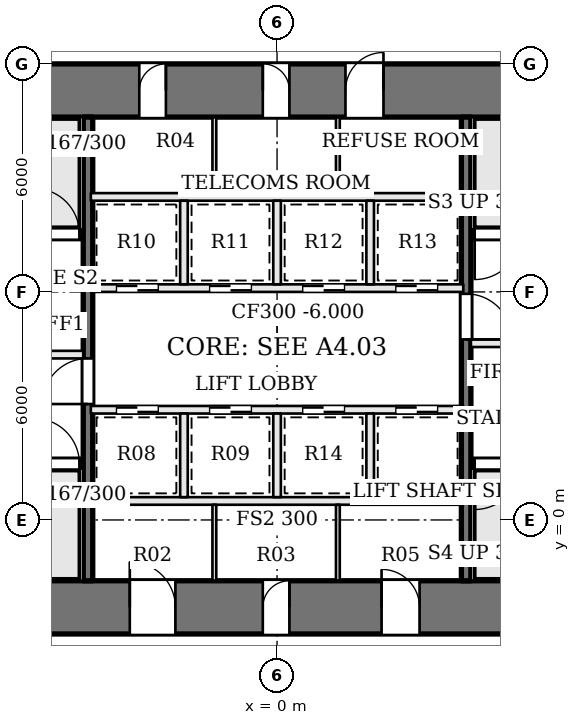
"""IFC4 building model, lengths in metres.
Left out: names, types, materials, properties, quantities, classifications, styles, units other than length and angle.
Written with IfcOpenShell. Run it as: python <this file> out.ifc"""

import sys

from ifc_helpers import new_model, si_unit, direction, frame, frame_2d, origin, place, context, subcontext, project, spatial, rectangle, extrude, element, fill, save


model = new_model("IFC4")
c1 = context("Model", 3, precision=1e-05, world=origin(), true_north=direction((0.0, 1.0)))
c2 = subcontext(c1, "Body", "Model", "MODEL_VIEW")
j1 = project(units=[si_unit("LENGTHUNIT", "METRE"), si_unit("PLANEANGLEUNIT", "RADIAN")], contexts=[c1])
p1 = place(None, origin())
s1 = spatial("IfcSite", under=j1, at=p1, CompositionType="ELEMENT")
p2 = place(p1, origin())
s2 = spatial("IfcBuilding", under=s1, at=p2, CompositionType="ELEMENT")
p3 = place(p2, frame((0.0, 0.0, -6.0)))
s3 = spatial("IfcBuildingStorey", under=s2, at=p3, CompositionType="ELEMENT", Elevation=-6.0)
p4 = place(p3, frame((-13.0, 11.3, 0.0), z_axis=(0.0, 0.0, 1.0), x_axis=(1.0, 0.0, 0.0)))
e1 = element("IfcWall", 1, at=p4, inside=s3, PredefinedType="SHEAR", context=c2, shape_type="SweptSolid", body=[
    extrude(rectangle(XDim=26.0, YDim=1.4, at=frame_2d((13.0, 0.0))), origin(), (0.0, 0.0, 1.0), 6.0),
])
p5 = place(p4, frame((9.375, 0.0, 0.0)))
e2 = element("IfcOpeningElement", 2, at=p5, cuts=e1, PredefinedType="OPENING", context=c2, shape_type="SweptSolid", body=[
    extrude(rectangle(XDim=0.7, YDim=2.1, at=frame_2d((0.35, 1.05))), frame((0.0, 0.71, 0.0), z_axis=(0.0, -1.0, 0.0), x_axis=(1.0, 0.0, 0.0)), (0.0, 0.0, 1.0), 1.42),
])
p6 = place(p4, frame((12.625, 0.0, 0.0)))
e3 = element("IfcOpeningElement", 3, at=p6, cuts=e1, PredefinedType="OPENING", context=c2, shape_type="SweptSolid", body=[
    extrude(rectangle(XDim=0.7, YDim=2.1, at=frame_2d((0.35, 1.05))), frame((0.0, 0.71, 0.0), z_axis=(0.0, -1.0, 0.0), x_axis=(1.0, 0.0, 0.0)), (0.0, 0.0, 1.0), 1.42),
])
p7 = place(p4, frame((14.8, 0.0, 0.0)))
e4 = element("IfcOpeningElement", 4, at=p7, cuts=e1, PredefinedType="OPENING", context=c2, shape_type="SweptSolid", body=[
    extrude(rectangle(XDim=1.0, YDim=2.1, at=frame_2d((0.5, 1.05))), frame((0.0, 0.71, 0.0), z_axis=(0.0, -1.0, 0.0), x_axis=(1.0, 0.0, 0.0)), (0.0, 0.0, 1.0), 1.42),
])
p8 = place(p3, frame((-13.0, -2.3, 0.0), z_axis=(0.0, 0.0, 1.0), x_axis=(1.0, 0.0, 0.0)))
e5 = element("IfcWall", 5, at=p8, inside=s3, PredefinedType="SHEAR", context=c2, shape_type="SweptSolid", body=[
    extrude(rectangle(XDim=26.0, YDim=1.4, at=frame_2d((13.0, 0.0))), origin(), (0.0, 0.0, 1.0), 6.0),
])
p9 = place(p8, frame((9.125, 0.0, 0.0)))
e6 = element("IfcOpeningElement", 6, at=p9, cuts=e5, PredefinedType="OPENING", context=c2, shape_type="SweptSolid", body=[
    extrude(rectangle(XDim=1.2, YDim=2.1, at=frame_2d((0.6, 1.05))), frame((0.0, 0.71, 0.0), z_axis=(0.0, -1.0, 0.0), x_axis=(1.0, 0.0, 0.0)), (0.0, 0.0, 1.0), 1.42),
])
p10 = place(p8, frame((12.625, 0.0, 0.0)))
e7 = element("IfcOpeningElement", 7, at=p10, cuts=e5, PredefinedType="OPENING", context=c2, shape_type="SweptSolid", body=[
    extrude(rectangle(XDim=0.7, YDim=2.1, at=frame_2d((0.35, 1.05))), frame((0.0, 0.71, 0.0), z_axis=(0.0, -1.0, 0.0), x_axis=(1.0, 0.0, 0.0)), (0.0, 0.0, 1.0), 1.42),
])
p11 = place(p8, frame((15.75, 0.0, 0.0)))
e8 = element("IfcOpeningElement", 8, at=p11, cuts=e5, PredefinedType="OPENING", context=c2, shape_type="SweptSolid", body=[
    extrude(rectangle(XDim=1.0, YDim=2.1, at=frame_2d((0.5, 1.05))), frame((0.0, 0.71, 0.0), z_axis=(0.0, -1.0, 0.0), x_axis=(1.0, 0.0, 0.0)), (0.0, 0.0, 1.0), 1.42),
])
p12 = place(p3, frame((-11.6, 1.475, 0.0), z_axis=(0.0, 0.0, 1.0), x_axis=(1.0, 0.0, 0.0)))
e9 = element("IfcWall", 9, at=p12, inside=s3, PredefinedType="SOLIDWALL", context=c2, shape_type="SweptSolid", body=[
    extrude(rectangle(XDim=6.5, YDim=0.25, at=frame_2d((3.25, 0.0))), origin(), (0.0, 0.0, 1.0), 5.65),
])
p13 = place(p12, frame((5.2, 0.0, 0.0)))
e10 = element("IfcOpeningElement", 10, at=p13, cuts=e9, PredefinedType="OPENING", context=c2, shape_type="SweptSolid", body=[
    extrude(rectangle(XDim=1.2, YDim=2.1, at=frame_2d((0.6, 1.05))), frame((0.0, 0.135, 0.0), z_axis=(0.0, -1.0, 0.0), x_axis=(1.0, 0.0, 0.0)), (0.0, 0.0, 1.0), 0.27),
])
p14 = place(p3, frame((11.6, 7.525, 0.0), z_axis=(0.0, 0.0, 1.0), x_axis=(-1.0, 0.0, 0.0)))
e11 = element("IfcWall", 11, at=p14, inside=s3, PredefinedType="SOLIDWALL", context=c2, shape_type="SweptSolid", body=[
    extrude(rectangle(XDim=6.5, YDim=0.25, at=frame_2d((3.25, 0.0))), origin(), (0.0, 0.0, 1.0), 5.65),
])
p15 = place(p14, frame((5.2, 0.0, 0.0)))
e12 = element("IfcOpeningElement", 12, at=p15, cuts=e11, PredefinedType="OPENING", context=c2, shape_type="SweptSolid", body=[
    extrude(rectangle(XDim=1.2, YDim=2.1, at=frame_2d((0.6, 1.05))), frame((0.0, 0.135, 0.0), z_axis=(0.0, -1.0, 0.0), x_axis=(1.0, 0.0, 0.0)), (0.0, 0.0, 1.0), 0.27),
])
p16 = place(p3, frame((-11.6, 4.35, 0.0), z_axis=(0.0, 0.0, 1.0), x_axis=(1.0, 0.0, 0.0)))
e13 = element("IfcWall", 13, at=p16, inside=s3, PredefinedType="SOLIDWALL", context=c2, shape_type="SweptSolid", body=[
    extrude(rectangle(XDim=6.5, YDim=0.2, at=frame_2d((3.25, 0.0))), origin(), (0.0, 0.0, 1.0), 5.65),
])
p17 = place(p16, frame((3.8, 0.0, 0.0)))
e14 = element("IfcOpeningElement", 14, at=p17, cuts=e13, PredefinedType="OPENING", context=c2, shape_type="SweptSolid", body=[
    extrude(rectangle(XDim=1.2, YDim=2.1, at=frame_2d((0.6, 1.05))), frame((0.0, 0.11, 0.0), z_axis=(0.0, -1.0, 0.0), x_axis=(1.0, 0.0, 0.0)), (0.0, 0.0, 1.0), 0.22),
])
p18 = place(p16, frame((0.5, 0.0, 0.0)))
e15 = element("IfcOpeningElement", 15, at=p18, cuts=e13, PredefinedType="OPENING", context=c2, shape_type="SweptSolid", body=[
    extrude(rectangle(XDim=1.2, YDim=2.1, at=frame_2d((0.6, 1.05))), frame((0.0, 0.11, 0.0), z_axis=(0.0, -1.0, 0.0), x_axis=(1.0, 0.0, 0.0)), (0.0, 0.0, 1.0), 0.22),
])
p19 = place(p3, frame((11.6, 4.65, 0.0), z_axis=(0.0, 0.0, 1.0), x_axis=(-1.0, 0.0, 0.0)))
e16 = element("IfcWall", 16, at=p19, inside=s3, PredefinedType="SOLIDWALL", context=c2, shape_type="SweptSolid", body=[
    extrude(rectangle(XDim=6.5, YDim=0.2, at=frame_2d((3.25, 0.0))), origin(), (0.0, 0.0, 1.0), 5.65),
])
p20 = place(p19, frame((3.8, 0.0, 0.0)))
e17 = element("IfcOpeningElement", 17, at=p20, cuts=e16, PredefinedType="OPENING", context=c2, shape_type="SweptSolid", body=[
    extrude(rectangle(XDim=1.2, YDim=2.1, at=frame_2d((0.6, 1.05))), frame((0.0, 0.11, 0.0), z_axis=(0.0, -1.0, 0.0), x_axis=(1.0, 0.0, 0.0)), (0.0, 0.0, 1.0), 0.22),
])
p21 = place(p19, frame((0.5, 0.0, 0.0)))
e18 = element("IfcOpeningElement", 18, at=p21, cuts=e16, PredefinedType="OPENING", context=c2, shape_type="SweptSolid", body=[
    extrude(rectangle(XDim=1.2, YDim=2.1, at=frame_2d((0.6, 1.05))), frame((0.0, 0.11, 0.0), z_axis=(0.0, -1.0, 0.0), x_axis=(1.0, 0.0, 0.0)), (0.0, 0.0, 1.0), 0.22),
])
p22 = place(p3, frame((-11.6, 7.525, 0.0), z_axis=(0.0, 0.0, 1.0), x_axis=(1.0, 0.0, 0.0)))
e19 = element("IfcWall", 19, at=p22, inside=s3, PredefinedType="SOLIDWALL", context=c2, shape_type="SweptSolid", body=[
    extrude(rectangle(XDim=6.5, YDim=0.25, at=frame_2d((3.25, 0.0))), origin(), (0.0, 0.0, 1.0), 5.65),
])
p23 = place(p22, frame((5.2, 0.0, 0.0)))
e20 = element("IfcOpeningElement", 20, at=p23, cuts=e19, PredefinedType="OPENING", context=c2, shape_type="SweptSolid", body=[
    extrude(rectangle(XDim=1.2, YDim=2.1, at=frame_2d((0.6, 1.05))), frame((0.0, 0.135, 0.0), z_axis=(0.0, -1.0, 0.0), x_axis=(1.0, 0.0, 0.0)), (0.0, 0.0, 1.0), 0.27),
])
p24 = place(p3, frame((11.6, 1.475, 0.0), z_axis=(0.0, 0.0, 1.0), x_axis=(-1.0, 0.0, 0.0)))
e21 = element("IfcWall", 21, at=p24, inside=s3, PredefinedType="SOLIDWALL", context=c2, shape_type="SweptSolid", body=[
    extrude(rectangle(XDim=6.5, YDim=0.25, at=frame_2d((3.25, 0.0))), origin(), (0.0, 0.0, 1.0), 5.65),
])
p25 = place(p24, frame((5.2, 0.0, 0.0)))
e22 = element("IfcOpeningElement", 22, at=p25, cuts=e21, PredefinedType="OPENING", context=c2, shape_type="SweptSolid", body=[
    extrude(rectangle(XDim=1.2, YDim=2.1, at=frame_2d((0.6, 1.05))), frame((0.0, 0.135, 0.0), z_axis=(0.0, -1.0, 0.0), x_axis=(1.0, 0.0, 0.0)), (0.0, 0.0, 1.0), 0.27),
])
p26 = place(p3, frame((-4.975, -1.6, 0.0), z_axis=(0.0, 0.0, 1.0), x_axis=(0.0, 1.0, 0.0)))
e23 = element("IfcWall", 23, at=p26, inside=s3, PredefinedType="SOLIDWALL", context=c2, shape_type="SweptSolid", body=[
    extrude(rectangle(XDim=12.2, YDim=0.25, at=frame_2d((6.1, 0.0))), origin(), (0.0, 0.0, 1.0), 5.65),
])
p27 = place(p26, frame((4.65, 0.0, 0.0)))
e24 = element("IfcOpeningElement", 24, at=p27, cuts=e23, PredefinedType="OPENING", context=c2, shape_type="SweptSolid", body=[
    extrude(rectangle(XDim=1.2, YDim=2.1, at=frame_2d((0.6, 1.05))), frame((0.0, 0.135, 0.0), z_axis=(0.0, -1.0, 0.0), x_axis=(1.0, 0.0, 0.0)), (0.0, 0.0, 1.0), 0.27),
])
p28 = place(p3, frame((4.975, 10.6, 0.0), z_axis=(0.0, 0.0, 1.0), x_axis=(0.0, -1.0, 0.0)))
e25 = element("IfcWall", 25, at=p28, inside=s3, PredefinedType="SOLIDWALL", context=c2, shape_type="SweptSolid", body=[
    extrude(rectangle(XDim=12.2, YDim=0.25, at=frame_2d((6.1, 0.0))), origin(), (0.0, 0.0, 1.0), 5.65),
])
p29 = place(p28, frame((4.65, 0.0, 0.0)))
e26 = element("IfcOpeningElement", 26, at=p29, cuts=e25, PredefinedType="OPENING", context=c2, shape_type="SweptSolid", body=[
    extrude(rectangle(XDim=1.2, YDim=2.1, at=frame_2d((0.6, 1.05))), frame((0.0, 0.135, 0.0), z_axis=(0.0, -1.0, 0.0), x_axis=(1.0, 0.0, 0.0)), (0.0, 0.0, 1.0), 0.27),
])
p30 = place(p3, frame((-4.9, 0.5, 0.0), z_axis=(0.0, 0.0, 1.0), x_axis=(1.0, 0.0, 0.0)))
e27 = element("IfcWall", 27, at=p30, inside=s3, PredefinedType="SOLIDWALL", context=c2, shape_type="SweptSolid", body=[
    extrude(rectangle(XDim=9.8, YDim=0.2, at=frame_2d((4.9, 0.0))), origin(), (0.0, 0.0, 1.0), 5.65),
])
p31 = place(p3, frame((-4.9, 2.9, 0.0), z_axis=(0.0, 0.0, 1.0), x_axis=(1.0, 0.0, 0.0)))
e28 = element("IfcWall", 28, at=p31, inside=s3, PredefinedType="SOLIDWALL", context=c2, shape_type="SweptSolid", body=[
    extrude(rectangle(XDim=9.8, YDim=0.2, at=frame_2d((4.9, 0.0))), origin(), (0.0, 0.0, 1.0), 5.65),
])
p32 = place(p31, frame((0.675, 0.0, 0.0)))
e29 = element("IfcOpeningElement", 29, at=p32, cuts=e28, PredefinedType="OPENING", context=c2, shape_type="SweptSolid", body=[
    extrude(rectangle(XDim=1.1, YDim=2.1, at=frame_2d((0.55, 1.05))), frame((0.0, 0.11, 0.0), z_axis=(0.0, -1.0, 0.0), x_axis=(1.0, 0.0, 0.0)), (0.0, 0.0, 1.0), 0.22),
])
p33 = place(p31, frame((3.125, 0.0, 0.0)))
e30 = element("IfcOpeningElement", 30, at=p33, cuts=e28, PredefinedType="OPENING", context=c2, shape_type="SweptSolid", body=[
    extrude(rectangle(XDim=1.1, YDim=2.1, at=frame_2d((0.55, 1.05))), frame((0.0, 0.11, 0.0), z_axis=(0.0, -1.0, 0.0), x_axis=(1.0, 0.0, 0.0)), (0.0, 0.0, 1.0), 0.22),
])
p34 = place(p31, frame((5.575, 0.0, 0.0)))
e31 = element("IfcOpeningElement", 31, at=p34, cuts=e28, PredefinedType="OPENING", context=c2, shape_type="SweptSolid", body=[
    extrude(rectangle(XDim=1.1, YDim=2.1, at=frame_2d((0.55, 1.05))), frame((0.0, 0.11, 0.0), z_axis=(0.0, -1.0, 0.0), x_axis=(1.0, 0.0, 0.0)), (0.0, 0.0, 1.0), 0.22),
])
p35 = place(p31, frame((8.025, 0.0, 0.0)))
e32 = element("IfcOpeningElement", 32, at=p35, cuts=e28, PredefinedType="OPENING", context=c2, shape_type="SweptSolid", body=[
    extrude(rectangle(XDim=1.1, YDim=2.1, at=frame_2d((0.55, 1.05))), frame((0.0, 0.11, 0.0), z_axis=(0.0, -1.0, 0.0), x_axis=(1.0, 0.0, 0.0)), (0.0, 0.0, 1.0), 0.22),
])
p36 = place(p3, frame((-4.9, 6.1, 0.0), z_axis=(0.0, 0.0, 1.0), x_axis=(1.0, 0.0, 0.0)))
e33 = element("IfcWall", 33, at=p36, inside=s3, PredefinedType="SOLIDWALL", context=c2, shape_type="SweptSolid", body=[
    extrude(rectangle(XDim=9.8, YDim=0.2, at=frame_2d((4.9, 0.0))), origin(), (0.0, 0.0, 1.0), 5.65),
])
p37 = place(p36, frame((0.675, 0.0, 0.0)))
e34 = element("IfcOpeningElement", 34, at=p37, cuts=e33, PredefinedType="OPENING", context=c2, shape_type="SweptSolid", body=[
    extrude(rectangle(XDim=1.1, YDim=2.1, at=frame_2d((0.55, 1.05))), frame((0.0, 0.11, 0.0), z_axis=(0.0, -1.0, 0.0), x_axis=(1.0, 0.0, 0.0)), (0.0, 0.0, 1.0), 0.22),
])
p38 = place(p36, frame((3.125, 0.0, 0.0)))
e35 = element("IfcOpeningElement", 35, at=p38, cuts=e33, PredefinedType="OPENING", context=c2, shape_type="SweptSolid", body=[
    extrude(rectangle(XDim=1.1, YDim=2.1, at=frame_2d((0.55, 1.05))), frame((0.0, 0.11, 0.0), z_axis=(0.0, -1.0, 0.0), x_axis=(1.0, 0.0, 0.0)), (0.0, 0.0, 1.0), 0.22),
])
p39 = place(p36, frame((5.575, 0.0, 0.0)))
e36 = element("IfcOpeningElement", 36, at=p39, cuts=e33, PredefinedType="OPENING", context=c2, shape_type="SweptSolid", body=[
    extrude(rectangle(XDim=1.1, YDim=2.1, at=frame_2d((0.55, 1.05))), frame((0.0, 0.11, 0.0), z_axis=(0.0, -1.0, 0.0), x_axis=(1.0, 0.0, 0.0)), (0.0, 0.0, 1.0), 0.22),
])
p40 = place(p36, frame((8.025, 0.0, 0.0)))
e37 = element("IfcOpeningElement", 37, at=p40, cuts=e33, PredefinedType="OPENING", context=c2, shape_type="SweptSolid", body=[
    extrude(rectangle(XDim=1.1, YDim=2.1, at=frame_2d((0.55, 1.05))), frame((0.0, 0.11, 0.0), z_axis=(0.0, -1.0, 0.0), x_axis=(1.0, 0.0, 0.0)), (0.0, 0.0, 1.0), 0.22),
])
p41 = place(p3, frame((-4.9, 8.5, 0.0), z_axis=(0.0, 0.0, 1.0), x_axis=(1.0, 0.0, 0.0)))
e38 = element("IfcWall", 38, at=p41, inside=s3, PredefinedType="SOLIDWALL", context=c2, shape_type="SweptSolid", body=[
    extrude(rectangle(XDim=9.8, YDim=0.2, at=frame_2d((4.9, 0.0))), origin(), (0.0, 0.0, 1.0), 5.65),
])
for number, where, z_axis, x_axis in (
    (39, (-2.45, 0.6, 0.0), (0.0, 0.0, 1.0), (0.0, 1.0, 0.0)),
    (40, (0.0, 0.6, 0.0), (0.0, 0.0, 1.0), (0.0, 1.0, 0.0)),
    (41, (2.45, 0.6, 0.0), (0.0, 0.0, 1.0), (0.0, 1.0, 0.0)),
    (42, (-2.45, 6.2, 0.0), (0.0, 0.0, 1.0), (0.0, 1.0, 0.0)),
    (43, (0.0, 6.2, 0.0), (0.0, 0.0, 1.0), (0.0, 1.0, 0.0)),
    (44, (2.45, 6.2, 0.0), (0.0, 0.0, 1.0), (0.0, 1.0, 0.0)),
):
    element("IfcWall", number, at=place(p3, frame(where, z_axis=z_axis, x_axis=x_axis)), inside=s3, PredefinedType="SOLIDWALL", context=c2, shape_type="SweptSolid", body=[
        extrude(rectangle(XDim=2.2, YDim=0.2, at=frame_2d((1.1, 0.0))), origin(), (0.0, 0.0, 1.0), 5.65),
    ])
for number, where, z_axis, x_axis in (
    (45, (-1.65, -1.6, 0.0), (0.0, 0.0, 1.0), (0.0, 1.0, 0.0)),
    (46, (1.6, -1.6, 0.0), (0.0, 0.0, 1.0), (0.0, 1.0, 0.0)),
    (47, (-1.65, 8.6, 0.0), (0.0, 0.0, 1.0), (0.0, 1.0, 0.0)),
    (48, (1.6, 8.6, 0.0), (0.0, 0.0, 1.0), (0.0, 1.0, 0.0)),
):
    element("IfcWall", number, at=place(p3, frame(where, z_axis=z_axis, x_axis=x_axis)), inside=s3, PredefinedType="PARTITIONING", context=c2, shape_type="SweptSolid", body=[
        extrude(rectangle(XDim=2.0, YDim=0.1, at=frame_2d((1.0, 0.0))), origin(), (0.0, 0.0, 1.0), 5.65),
    ])
p42 = place(p27, origin())
e49 = element("IfcDoor", 49, at=p42, inside=s3, OperationType="SINGLE_SWING_LEFT", PredefinedType="DOOR", context=c2, shape_type="SweptSolid", body=[
    extrude(rectangle(XDim=1.2, YDim=2.1, at=frame_2d((0.6, 1.05))), frame((0.0, 0.025, 0.0), z_axis=(0.0, -1.0, 0.0), x_axis=(1.0, 0.0, 0.0)), (0.0, 0.0, 1.0), 0.05),
])
fill(e24, e49)
p43 = place(p29, origin())
e50 = element("IfcDoor", 50, at=p43, inside=s3, OperationType="SINGLE_SWING_RIGHT", PredefinedType="DOOR", context=c2, shape_type="SweptSolid", body=[
    extrude(rectangle(XDim=1.2, YDim=2.1, at=frame_2d((0.6, 1.05))), frame((0.0, 0.025, 0.0), z_axis=(0.0, -1.0, 0.0), x_axis=(1.0, 0.0, 0.0)), (0.0, 0.0, 1.0), 0.05),
])
fill(e26, e50)
p44 = place(p13, origin())
e51 = element("IfcDoor", 51, at=p44, inside=s3, OperationType="SINGLE_SWING_LEFT", PredefinedType="DOOR", context=c2, shape_type="SweptSolid", body=[
    extrude(rectangle(XDim=1.2, YDim=2.1, at=frame_2d((0.6, 1.05))), frame((0.0, 0.025, 0.0), z_axis=(0.0, -1.0, 0.0), x_axis=(1.0, 0.0, 0.0)), (0.0, 0.0, 1.0), 0.05),
])
fill(e10, e51)
p45 = place(p15, origin())
e52 = element("IfcDoor", 52, at=p45, inside=s3, OperationType="SINGLE_SWING_RIGHT", PredefinedType="DOOR", context=c2, shape_type="SweptSolid", body=[
    extrude(rectangle(XDim=1.2, YDim=2.1, at=frame_2d((0.6, 1.05))), frame((0.0, 0.025, 0.0), z_axis=(0.0, -1.0, 0.0), x_axis=(1.0, 0.0, 0.0)), (0.0, 0.0, 1.0), 0.05),
])
fill(e12, e52)
p46 = place(p23, origin())
e53 = element("IfcDoor", 53, at=p46, inside=s3, OperationType="SINGLE_SWING_LEFT", PredefinedType="DOOR", context=c2, shape_type="SweptSolid", body=[
    extrude(rectangle(XDim=1.2, YDim=2.1, at=frame_2d((0.6, 1.05))), frame((0.0, 0.025, 0.0), z_axis=(0.0, -1.0, 0.0), x_axis=(1.0, 0.0, 0.0)), (0.0, 0.0, 1.0), 0.05),
])
fill(e20, e53)
p47 = place(p25, origin())
e54 = element("IfcDoor", 54, at=p47, inside=s3, OperationType="SINGLE_SWING_RIGHT", PredefinedType="DOOR", context=c2, shape_type="SweptSolid", body=[
    extrude(rectangle(XDim=1.2, YDim=2.1, at=frame_2d((0.6, 1.05))), frame((0.0, 0.025, 0.0), z_axis=(0.0, -1.0, 0.0), x_axis=(1.0, 0.0, 0.0)), (0.0, 0.0, 1.0), 0.05),
])
fill(e22, e54)
p48 = place(p32, origin())
e55 = element("IfcDoor", 55, at=p48, inside=s3, OperationType="SLIDING_TO_RIGHT", PredefinedType="DOOR", context=c2, shape_type="SweptSolid", body=[
    extrude(rectangle(XDim=1.1, YDim=2.1, at=frame_2d((0.55, 1.05))), frame((0.0, 0.025, 0.0), z_axis=(0.0, -1.0, 0.0), x_axis=(1.0, 0.0, 0.0)), (0.0, 0.0, 1.0), 0.05),
])
fill(e29, e55)
p49 = place(p33, origin())
e56 = element("IfcDoor", 56, at=p49, inside=s3, OperationType="SLIDING_TO_LEFT", PredefinedType="DOOR", context=c2, shape_type="SweptSolid", body=[
    extrude(rectangle(XDim=1.1, YDim=2.1, at=frame_2d((0.55, 1.05))), frame((0.0, 0.025, 0.0), z_axis=(0.0, -1.0, 0.0), x_axis=(1.0, 0.0, 0.0)), (0.0, 0.0, 1.0), 0.05),
])
fill(e30, e56)
p50 = place(p34, origin())
e57 = element("IfcDoor", 57, at=p50, inside=s3, OperationType="SLIDING_TO_LEFT", PredefinedType="DOOR", context=c2, shape_type="SweptSolid", body=[
    extrude(rectangle(XDim=1.1, YDim=2.1, at=frame_2d((0.55, 1.05))), frame((0.0, 0.025, 0.0), z_axis=(0.0, -1.0, 0.0), x_axis=(1.0, 0.0, 0.0)), (0.0, 0.0, 1.0), 0.05),
])
fill(e31, e57)
p51 = place(p35, origin())
e58 = element("IfcDoor", 58, at=p51, inside=s3, OperationType="SLIDING_TO_RIGHT", PredefinedType="DOOR", context=c2, shape_type="SweptSolid", body=[
    extrude(rectangle(XDim=1.1, YDim=2.1, at=frame_2d((0.55, 1.05))), frame((0.0, 0.025, 0.0), z_axis=(0.0, -1.0, 0.0), x_axis=(1.0, 0.0, 0.0)), (0.0, 0.0, 1.0), 0.05),
])
fill(e32, e58)
p52 = place(p37, origin())
e59 = element("IfcDoor", 59, at=p52, inside=s3, OperationType="SLIDING_TO_RIGHT", PredefinedType="DOOR", context=c2, shape_type="SweptSolid", body=[
    extrude(rectangle(XDim=1.1, YDim=2.1, at=frame_2d((0.55, 1.05))), frame((0.0, 0.025, 0.0), z_axis=(0.0, -1.0, 0.0), x_axis=(1.0, 0.0, 0.0)), (0.0, 0.0, 1.0), 0.05),
])
fill(e34, e59)
p53 = place(p38, origin())
e60 = element("IfcDoor", 60, at=p53, inside=s3, OperationType="SLIDING_TO_LEFT", PredefinedType="DOOR", context=c2, shape_type="SweptSolid", body=[
    extrude(rectangle(XDim=1.1, YDim=2.1, at=frame_2d((0.55, 1.05))), frame((0.0, 0.025, 0.0), z_axis=(0.0, -1.0, 0.0), x_axis=(1.0, 0.0, 0.0)), (0.0, 0.0, 1.0), 0.05),
])
fill(e35, e60)
p54 = place(p39, origin())
e61 = element("IfcDoor", 61, at=p54, inside=s3, OperationType="SLIDING_TO_RIGHT", PredefinedType="DOOR", context=c2, shape_type="SweptSolid", body=[
    extrude(rectangle(XDim=1.1, YDim=2.1, at=frame_2d((0.55, 1.05))), frame((0.0, 0.025, 0.0), z_axis=(0.0, -1.0, 0.0), x_axis=(1.0, 0.0, 0.0)), (0.0, 0.0, 1.0), 0.05),
])
fill(e36, e61)
p55 = place(p40, origin())
e62 = element("IfcDoor", 62, at=p55, inside=s3, OperationType="SLIDING_TO_LEFT", PredefinedType="DOOR", context=c2, shape_type="SweptSolid", body=[
    extrude(rectangle(XDim=1.1, YDim=2.1, at=frame_2d((0.55, 1.05))), frame((0.0, 0.025, 0.0), z_axis=(0.0, -1.0, 0.0), x_axis=(1.0, 0.0, 0.0)), (0.0, 0.0, 1.0), 0.05),
])
fill(e37, e62)
p56 = place(p9, origin())
e63 = element("IfcDoor", 63, at=p56, inside=s3, OperationType="SINGLE_SWING_LEFT", PredefinedType="DOOR", context=c2, shape_type="SweptSolid", body=[
    extrude(rectangle(XDim=1.2, YDim=2.1, at=frame_2d((0.6, 1.05))), frame((0.0, 0.025, 0.0), z_axis=(0.0, -1.0, 0.0), x_axis=(1.0, 0.0, 0.0)), (0.0, 0.0, 1.0), 0.05),
])
fill(e6, e63)
p57 = place(p10, origin())
e64 = element("IfcDoor", 64, at=p57, inside=s3, OperationType="SINGLE_SWING_RIGHT", PredefinedType="DOOR", context=c2, shape_type="SweptSolid", body=[
    extrude(rectangle(XDim=0.7, YDim=2.1, at=frame_2d((0.35, 1.05))), frame((0.0, 0.025, 0.0), z_axis=(0.0, -1.0, 0.0), x_axis=(1.0, 0.0, 0.0)), (0.0, 0.0, 1.0), 0.05),
])
fill(e7, e64)
p58 = place(p11, origin())
e65 = element("IfcDoor", 65, at=p58, inside=s3, OperationType="SINGLE_SWING_LEFT", PredefinedType="DOOR", context=c2, shape_type="SweptSolid", body=[
    extrude(rectangle(XDim=1.0, YDim=2.1, at=frame_2d((0.5, 1.05))), frame((0.0, 0.025, 0.0), z_axis=(0.0, -1.0, 0.0), x_axis=(1.0, 0.0, 0.0)), (0.0, 0.0, 1.0), 0.05),
])
fill(e8, e65)
p59 = place(p5, origin())
e66 = element("IfcDoor", 66, at=p59, inside=s3, OperationType="SINGLE_SWING_RIGHT", PredefinedType="DOOR", context=c2, shape_type="SweptSolid", body=[
    extrude(rectangle(XDim=0.7, YDim=2.1, at=frame_2d((0.35, 1.05))), frame((0.0, 0.025, 0.0), z_axis=(0.0, -1.0, 0.0), x_axis=(1.0, 0.0, 0.0)), (0.0, 0.0, 1.0), 0.05),
])
fill(e2, e66)
p60 = place(p6, origin())
e67 = element("IfcDoor", 67, at=p60, inside=s3, OperationType="SINGLE_SWING_LEFT", PredefinedType="DOOR", context=c2, shape_type="SweptSolid", body=[
    extrude(rectangle(XDim=0.7, YDim=2.1, at=frame_2d((0.35, 1.05))), frame((0.0, 0.025, 0.0), z_axis=(0.0, -1.0, 0.0), x_axis=(1.0, 0.0, 0.0)), (0.0, 0.0, 1.0), 0.05),
])
fill(e3, e67)
p61 = place(p7, origin())
e68 = element("IfcDoor", 68, at=p61, inside=s3, OperationType="SINGLE_SWING_RIGHT", PredefinedType="DOOR", context=c2, shape_type="SweptSolid", body=[
    extrude(rectangle(XDim=1.0, YDim=2.1, at=frame_2d((0.5, 1.05))), frame((0.0, 0.025, 0.0), z_axis=(0.0, -1.0, 0.0), x_axis=(1.0, 0.0, 0.0)), (0.0, 0.0, 1.0), 0.05),
])
fill(e4, e68)
save(model, sys.argv[1])
